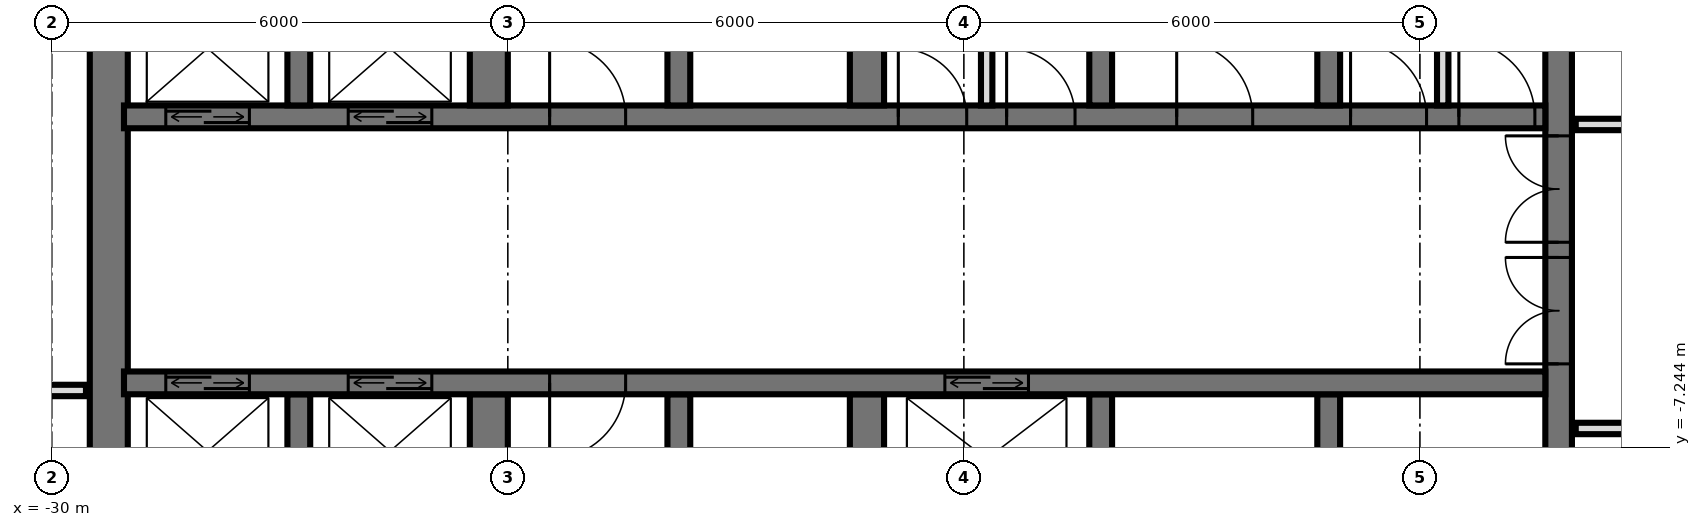
"""IFC4 building model, lengths in metres.
Left out: names, types, materials, properties, quantities, classifications, styles, units other than length and angle.
Written with IfcOpenShell. Run it as: python <this file> out.ifc"""

import sys

from ifc_helpers import new_model, si_unit, direction, frame, frame_2d, origin, place, context, subcontext, project, spatial, rectangle, extrude, element, fill, save


model = new_model("IFC4")
c1 = context("Model", 3, precision=1e-05, world=origin(), true_north=direction((0.0, 1.0)))
c2 = subcontext(c1, "Body", "Model", "MODEL_VIEW")
j1 = project(units=[si_unit("LENGTHUNIT", "METRE"), si_unit("PLANEANGLEUNIT", "RADIAN")], contexts=[c1])
p1 = place(None, origin())
s1 = spatial("IfcSite", under=j1, at=p1, CompositionType="ELEMENT")
p2 = place(p1, origin())
s2 = spatial("IfcBuilding", under=s1, at=p2, CompositionType="ELEMENT")
p3 = place(p2, frame((0.0, 0.0, 70.8)))
s3 = spatial("IfcBuildingStorey", under=s2, at=p3, CompositionType="ELEMENT", Elevation=70.8)
p4 = place(p3, frame((-10.175, -14.55, 0.0), z_axis=(0.0, 0.0, 1.0), x_axis=(0.0, 1.0, 0.0)))
e1 = element("IfcWall", 1, at=p4, inside=s3, PredefinedType="SHEAR", context=c2, shape_type="SweptSolid", body=[
    extrude(rectangle(XDim=14.1, YDim=0.35, at=frame_2d((7.05, 0.0))), origin(), (0.0, 0.0, 1.0), 3.6),
])
p5 = place(p4, frame((8.4, 0.0, 0.0)))
e2 = element("IfcOpeningElement", 2, at=p5, cuts=e1, PredefinedType="OPENING", context=c2, shape_type="SweptSolid", body=[
    extrude(rectangle(XDim=1.4, YDim=2.4, at=frame_2d((0.7, 1.2))), frame((0.0, 0.185, 0.0), z_axis=(0.0, -1.0, 0.0), x_axis=(1.0, 0.0, 0.0)), (0.0, 0.0, 1.0), 0.37),
])
p6 = place(p4, frame((10.0, 0.0, 0.0)))
e3 = element("IfcOpeningElement", 3, at=p6, cuts=e1, PredefinedType="OPENING", context=c2, shape_type="SweptSolid", body=[
    extrude(rectangle(XDim=1.4, YDim=2.4, at=frame_2d((0.7, 1.2))), frame((0.0, 0.185, 0.0), z_axis=(0.0, -1.0, 0.0), x_axis=(1.0, 0.0, 0.0)), (0.0, 0.0, 1.0), 0.37),
])
p7 = place(p4, frame((4.0, 0.0, 0.0)))
e4 = element("IfcOpeningElement", 4, at=p7, cuts=e1, PredefinedType="OPENING", context=c2, shape_type="SweptSolid", body=[
    extrude(rectangle(XDim=1.2, YDim=2.1, at=frame_2d((0.6, 1.05))), frame((0.0, 0.185, 0.0), z_axis=(0.0, -1.0, 0.0), x_axis=(1.0, 0.0, 0.0)), (0.0, 0.0, 1.0), 0.37),
])
p8 = place(p3, frame((-29.25, -14.55, 0.0), z_axis=(0.0, 0.0, 1.0), x_axis=(0.0, 1.0, 0.0)))
e5 = element("IfcWall", 5, at=p8, inside=s3, PredefinedType="SHEAR", context=c2, shape_type="SweptSolid", body=[
    extrude(rectangle(XDim=14.1, YDim=0.5, at=frame_2d((7.05, 0.0))), origin(), (0.0, 0.0, 1.0), 3.6),
])
p9 = place(p3, frame((-29.05, -2.9, 0.0), z_axis=(0.0, 0.0, 1.0), x_axis=(1.0, 0.0, 0.0)))
e6 = element("IfcWall", 6, at=p9, inside=s3, PredefinedType="SHEAR", context=c2, shape_type="SweptSolid", body=[
    extrude(rectangle(XDim=18.7, YDim=0.3, at=frame_2d((9.35, 0.0))), origin(), (0.0, 0.0, 1.0), 3.6),
])
p10 = place(p9, frame((2.95, 0.0, 0.0)))
e7 = element("IfcOpeningElement", 7, at=p10, cuts=e6, PredefinedType="OPENING", context=c2, shape_type="SweptSolid", body=[
    extrude(rectangle(XDim=1.1, YDim=2.1, at=frame_2d((0.55, 1.05))), frame((0.0, 0.16, 0.0), z_axis=(0.0, -1.0, 0.0), x_axis=(1.0, 0.0, 0.0)), (0.0, 0.0, 1.0), 0.32),
])
p11 = place(p9, frame((0.55, 0.0, 0.0)))
e8 = element("IfcOpeningElement", 8, at=p11, cuts=e6, PredefinedType="OPENING", context=c2, shape_type="SweptSolid", body=[
    extrude(rectangle(XDim=1.1, YDim=2.1, at=frame_2d((0.55, 1.05))), frame((0.0, 0.16, 0.0), z_axis=(0.0, -1.0, 0.0), x_axis=(1.0, 0.0, 0.0)), (0.0, 0.0, 1.0), 0.32),
])
p12 = place(p9, frame((11.613, 0.0, 0.0)))
e9 = element("IfcOpeningElement", 9, at=p12, cuts=e6, PredefinedType="OPENING", context=c2, shape_type="SweptSolid", body=[
    extrude(rectangle(XDim=0.9, YDim=2.1, at=frame_2d((0.45, 1.05))), frame((0.0, 0.16, 0.0), z_axis=(0.0, -1.0, 0.0), x_axis=(1.0, 0.0, 0.0)), (0.0, 0.0, 1.0), 0.32),
])
p13 = place(p9, frame((10.188, 0.0, 0.0)))
e10 = element("IfcOpeningElement", 10, at=p13, cuts=e6, PredefinedType="OPENING", context=c2, shape_type="SweptSolid", body=[
    extrude(rectangle(XDim=0.9, YDim=2.1, at=frame_2d((0.45, 1.05))), frame((0.0, 0.16, 0.0), z_axis=(0.0, -1.0, 0.0), x_axis=(1.0, 0.0, 0.0)), (0.0, 0.0, 1.0), 0.32),
])
p14 = place(p9, frame((17.562, 0.0, 0.0)))
e11 = element("IfcOpeningElement", 11, at=p14, cuts=e6, PredefinedType="OPENING", context=c2, shape_type="SweptSolid", body=[
    extrude(rectangle(XDim=1.0, YDim=2.1, at=frame_2d((0.5, 1.05))), frame((0.0, 0.16, 0.0), z_axis=(0.0, -1.0, 0.0), x_axis=(1.0, 0.0, 0.0)), (0.0, 0.0, 1.0), 0.32),
])
p15 = place(p9, frame((16.137, 0.0, 0.0)))
e12 = element("IfcOpeningElement", 12, at=p15, cuts=e6, PredefinedType="OPENING", context=c2, shape_type="SweptSolid", body=[
    extrude(rectangle(XDim=1.0, YDim=2.1, at=frame_2d((0.5, 1.05))), frame((0.0, 0.16, 0.0), z_axis=(0.0, -1.0, 0.0), x_axis=(1.0, 0.0, 0.0)), (0.0, 0.0, 1.0), 0.32),
])
p16 = place(p9, frame((13.85, 0.0, 0.0)))
e13 = element("IfcOpeningElement", 13, at=p16, cuts=e6, PredefinedType="OPENING", context=c2, shape_type="SweptSolid", body=[
    extrude(rectangle(XDim=1.0, YDim=2.1, at=frame_2d((0.5, 1.05))), frame((0.0, 0.16, 0.0), z_axis=(0.0, -1.0, 0.0), x_axis=(1.0, 0.0, 0.0)), (0.0, 0.0, 1.0), 0.32),
])
p17 = place(p9, frame((5.6, 0.0, 0.0)))
e14 = element("IfcOpeningElement", 14, at=p17, cuts=e6, PredefinedType="OPENING", context=c2, shape_type="SweptSolid", body=[
    extrude(rectangle(XDim=1.0, YDim=2.1, at=frame_2d((0.5, 1.05))), frame((0.0, 0.16, 0.0), z_axis=(0.0, -1.0, 0.0), x_axis=(1.0, 0.0, 0.0)), (0.0, 0.0, 1.0), 0.32),
])
p18 = place(p3, frame((-29.05, -6.4, 0.0), z_axis=(0.0, 0.0, 1.0), x_axis=(1.0, 0.0, 0.0)))
e15 = element("IfcWall", 15, at=p18, inside=s3, PredefinedType="SHEAR", context=c2, shape_type="SweptSolid", body=[
    extrude(rectangle(XDim=18.7, YDim=0.3, at=frame_2d((9.35, 0.0))), origin(), (0.0, 0.0, 1.0), 3.6),
])
p19 = place(p18, frame((2.95, 0.0, 0.0)))
e16 = element("IfcOpeningElement", 16, at=p19, cuts=e15, PredefinedType="OPENING", context=c2, shape_type="SweptSolid", body=[
    extrude(rectangle(XDim=1.1, YDim=2.1, at=frame_2d((0.55, 1.05))), frame((0.0, 0.16, 0.0), z_axis=(0.0, -1.0, 0.0), x_axis=(1.0, 0.0, 0.0)), (0.0, 0.0, 1.0), 0.32),
])
p20 = place(p18, frame((0.55, 0.0, 0.0)))
e17 = element("IfcOpeningElement", 17, at=p20, cuts=e15, PredefinedType="OPENING", context=c2, shape_type="SweptSolid", body=[
    extrude(rectangle(XDim=1.1, YDim=2.1, at=frame_2d((0.55, 1.05))), frame((0.0, 0.16, 0.0), z_axis=(0.0, -1.0, 0.0), x_axis=(1.0, 0.0, 0.0)), (0.0, 0.0, 1.0), 0.32),
])
p21 = place(p18, frame((10.8, 0.0, 0.0)))
e18 = element("IfcOpeningElement", 18, at=p21, cuts=e15, PredefinedType="OPENING", context=c2, shape_type="SweptSolid", body=[
    extrude(rectangle(XDim=1.1, YDim=2.1, at=frame_2d((0.55, 1.05))), frame((0.0, 0.16, 0.0), z_axis=(0.0, -1.0, 0.0), x_axis=(1.0, 0.0, 0.0)), (0.0, 0.0, 1.0), 0.32),
])
p22 = place(p18, frame((5.6, 0.0, 0.0)))
e19 = element("IfcOpeningElement", 19, at=p22, cuts=e15, PredefinedType="OPENING", context=c2, shape_type="SweptSolid", body=[
    extrude(rectangle(XDim=1.0, YDim=2.1, at=frame_2d((0.5, 1.05))), frame((0.0, 0.16, 0.0), z_axis=(0.0, -1.0, 0.0), x_axis=(1.0, 0.0, 0.0)), (0.0, 0.0, 1.0), 0.32),
])
for number, where, z_axis, x_axis in (
    (20, (-13.2, -2.75, 0.0), (0.0, 0.0, 1.0), (0.0, 1.0, 0.0)),
    (21, (-13.2, -8.85, 0.0), (0.0, 0.0, 1.0), (0.0, 1.0, 0.0)),
    (22, (-16.2, -2.75, 0.0), (0.0, 0.0, 1.0), (0.0, 1.0, 0.0)),
    (23, (-16.2, -8.85, 0.0), (0.0, 0.0, 1.0), (0.0, 1.0, 0.0)),
):
    element("IfcWall", number, at=place(p3, frame(where, z_axis=z_axis, x_axis=x_axis)), inside=s3, PredefinedType="SHEAR", context=c2, shape_type="SweptSolid", body=[
        extrude(rectangle(XDim=2.3, YDim=0.3, at=frame_2d((1.15, 0.0))), origin(), (0.0, 0.0, 1.0), 3.6),
    ])
for number, where, z_axis, x_axis in (
    (24, (-19.275, -2.75, 0.0), (0.0, 0.0, 1.0), (0.0, 1.0, 0.0)),
    (25, (-19.275, -8.85, 0.0), (0.0, 0.0, 1.0), (0.0, 1.0, 0.0)),
):
    element("IfcWall", number, at=place(p3, frame(where, z_axis=z_axis, x_axis=x_axis)), inside=s3, PredefinedType="SHEAR", context=c2, shape_type="SweptSolid", body=[
        extrude(rectangle(XDim=2.3, YDim=0.45, at=frame_2d((1.15, 0.0))), origin(), (0.0, 0.0, 1.0), 3.6),
    ])
for number, where, z_axis, x_axis in (
    (26, (-21.75, -2.75, 0.0), (0.0, 0.0, 1.0), (0.0, 1.0, 0.0)),
    (27, (-21.75, -8.85, 0.0), (0.0, 0.0, 1.0), (0.0, 1.0, 0.0)),
):
    element("IfcWall", number, at=place(p3, frame(where, z_axis=z_axis, x_axis=x_axis)), inside=s3, PredefinedType="SHEAR", context=c2, shape_type="SweptSolid", body=[
        extrude(rectangle(XDim=2.3, YDim=0.3, at=frame_2d((1.15, 0.0))), origin(), (0.0, 0.0, 1.0), 3.6),
    ])
for number, where, z_axis, x_axis in (
    (28, (-24.25, -2.75, 0.0), (0.0, 0.0, 1.0), (0.0, 1.0, 0.0)),
    (29, (-24.25, -8.85, 0.0), (0.0, 0.0, 1.0), (0.0, 1.0, 0.0)),
):
    element("IfcWall", number, at=place(p3, frame(where, z_axis=z_axis, x_axis=x_axis)), inside=s3, PredefinedType="SHEAR", context=c2, shape_type="SweptSolid", body=[
        extrude(rectangle(XDim=2.3, YDim=0.5, at=frame_2d((1.15, 0.0))), origin(), (0.0, 0.0, 1.0), 3.6),
    ])
for number, where, z_axis, x_axis in (
    (30, (-26.75, -2.75, 0.0), (0.0, 0.0, 1.0), (0.0, 1.0, 0.0)),
    (31, (-26.75, -8.85, 0.0), (0.0, 0.0, 1.0), (0.0, 1.0, 0.0)),
):
    element("IfcWall", number, at=place(p3, frame(where, z_axis=z_axis, x_axis=x_axis)), inside=s3, PredefinedType="SHEAR", context=c2, shape_type="SweptSolid", body=[
        extrude(rectangle(XDim=2.3, YDim=0.3, at=frame_2d((1.15, 0.0))), origin(), (0.0, 0.0, 1.0), 3.6),
    ])
for number, where, z_axis, x_axis in (
    (32, (-17.7, -2.75, 0.0), (0.0, 0.0, 1.0), (0.0, 1.0, 0.0)),
    (33, (-11.7, -2.75, 0.0), (0.0, 0.0, 1.0), (0.0, 1.0, 0.0)),
):
    element("IfcWall", number, at=place(p3, frame(where, z_axis=z_axis, x_axis=x_axis)), inside=s3, PredefinedType="PARTITIONING", context=c2, shape_type="SweptSolid", body=[
        extrude(rectangle(XDim=2.3, YDim=0.15, at=frame_2d((1.15, 0.0))), origin(), (0.0, 0.0, 1.0), 3.3),
    ])
p23 = place(p3, frame((-9.95, -7.0, 0.0), z_axis=(0.0, 0.0, 1.0), x_axis=(1.0, 0.0, 0.0)))
e34 = element("IfcWall", 34, at=p23, inside=s3, PredefinedType="PARTITIONING", context=c2, shape_type="SweptSolid", body=[
    extrude(rectangle(XDim=19.9, YDim=0.15, at=frame_2d((9.95, 0.0))), origin(), (0.0, 0.0, 1.0), 3.32),
])
p24 = place(p23, frame((9.45, 0.0, 0.0)))
e35 = element("IfcOpeningElement", 35, at=p24, cuts=e34, PredefinedType="OPENING", context=c2, shape_type="SweptSolid", body=[
    extrude(rectangle(XDim=1.0, YDim=2.1, at=frame_2d((0.5, 1.05))), frame((0.0, 0.085, 0.0), z_axis=(0.0, -1.0, 0.0), x_axis=(1.0, 0.0, 0.0)), (0.0, 0.0, 1.0), 0.17),
])
p25 = place(p23, frame((3.45, 0.0, 0.0)))
e36 = element("IfcOpeningElement", 36, at=p25, cuts=e34, PredefinedType="OPENING", context=c2, shape_type="SweptSolid", body=[
    extrude(rectangle(XDim=1.0, YDim=2.1, at=frame_2d((0.5, 1.05))), frame((0.0, 0.085, 0.0), z_axis=(0.0, -1.0, 0.0), x_axis=(1.0, 0.0, 0.0)), (0.0, 0.0, 1.0), 0.17),
])
p26 = place(p3, frame((-33.12, -6.5, 0.0), z_axis=(0.0, 0.0, 1.0), x_axis=(1.0, 0.0, 0.0)))
e37 = element("IfcWall", 37, at=p26, inside=s3, PredefinedType="PARTITIONING", context=c2, shape_type="SweptSolid", body=[
    extrude(rectangle(XDim=3.57, YDim=0.15, at=frame_2d((1.785, 0.0))), origin(), (0.0, 0.0, 1.0), 3.32),
])
p27 = place(p26, frame((1.27, 0.0, 0.0)))
e38 = element("IfcOpeningElement", 38, at=p27, cuts=e37, PredefinedType="OPENING", context=c2, shape_type="SweptSolid", body=[
    extrude(rectangle(XDim=0.9, YDim=2.1, at=frame_2d((0.45, 1.05))), frame((0.0, 0.085, 0.0), z_axis=(0.0, -1.0, 0.0), x_axis=(1.0, 0.0, 0.0)), (0.0, 0.0, 1.0), 0.17),
])
p28 = place(p3, frame((-9.95, -3.0, 0.0), z_axis=(0.0, 0.0, 1.0), x_axis=(1.0, 0.0, 0.0)))
e39 = element("IfcWall", 39, at=p28, inside=s3, PredefinedType="PARTITIONING", context=c2, shape_type="SweptSolid", body=[
    extrude(rectangle(XDim=19.9, YDim=0.15, at=frame_2d((9.95, 0.0))), origin(), (0.0, 0.0, 1.0), 3.32),
])
p29 = place(p28, frame((1.45, 0.0, 0.0)))
e40 = element("IfcOpeningElement", 40, at=p29, cuts=e39, PredefinedType="OPENING", context=c2, shape_type="SweptSolid", body=[
    extrude(rectangle(XDim=1.0, YDim=2.1, at=frame_2d((0.5, 1.05))), frame((0.0, 0.085, 0.0), z_axis=(0.0, -1.0, 0.0), x_axis=(1.0, 0.0, 0.0)), (0.0, 0.0, 1.0), 0.17),
])
p30 = place(p28, frame((4.95, 0.0, 0.0)))
e41 = element("IfcOpeningElement", 41, at=p30, cuts=e39, PredefinedType="OPENING", context=c2, shape_type="SweptSolid", body=[
    extrude(rectangle(XDim=1.0, YDim=2.1, at=frame_2d((0.5, 1.05))), frame((0.0, 0.085, 0.0), z_axis=(0.0, -1.0, 0.0), x_axis=(1.0, 0.0, 0.0)), (0.0, 0.0, 1.0), 0.17),
])
p31 = place(p28, frame((7.7, 0.0, 0.0)))
e42 = element("IfcOpeningElement", 42, at=p31, cuts=e39, PredefinedType="OPENING", context=c2, shape_type="SweptSolid", body=[
    extrude(rectangle(XDim=1.0, YDim=2.1, at=frame_2d((0.5, 1.05))), frame((0.0, 0.085, 0.0), z_axis=(0.0, -1.0, 0.0), x_axis=(1.0, 0.0, 0.0)), (0.0, 0.0, 1.0), 0.17),
])
p32 = place(p28, frame((14.2, 0.0, 0.0)))
e43 = element("IfcOpeningElement", 43, at=p32, cuts=e39, PredefinedType="OPENING", context=c2, shape_type="SweptSolid", body=[
    extrude(rectangle(XDim=1.0, YDim=2.1, at=frame_2d((0.5, 1.05))), frame((0.0, 0.085, 0.0), z_axis=(0.0, -1.0, 0.0), x_axis=(1.0, 0.0, 0.0)), (0.0, 0.0, 1.0), 0.17),
])
p33 = place(p10, origin())
e44 = element("IfcDoor", 44, at=p33, inside=s3, OperationType="DOUBLE_DOOR_SLIDING", PredefinedType="USERDEFINED", context=c2, shape_type="SweptSolid", body=[
    extrude(rectangle(XDim=1.1, YDim=2.1, at=frame_2d((0.55, 1.05))), frame((0.0, 0.025, 0.0), z_axis=(0.0, -1.0, 0.0), x_axis=(1.0, 0.0, 0.0)), (0.0, 0.0, 1.0), 0.05),
])
fill(e7, e44)
p34 = place(p11, origin())
e45 = element("IfcDoor", 45, at=p34, inside=s3, OperationType="DOUBLE_DOOR_SLIDING", PredefinedType="USERDEFINED", context=c2, shape_type="SweptSolid", body=[
    extrude(rectangle(XDim=1.1, YDim=2.1, at=frame_2d((0.55, 1.05))), frame((0.0, 0.025, 0.0), z_axis=(0.0, -1.0, 0.0), x_axis=(1.0, 0.0, 0.0)), (0.0, 0.0, 1.0), 0.05),
])
fill(e8, e45)
p35 = place(p19, origin())
e46 = element("IfcDoor", 46, at=p35, inside=s3, OperationType="DOUBLE_DOOR_SLIDING", PredefinedType="USERDEFINED", context=c2, shape_type="SweptSolid", body=[
    extrude(rectangle(XDim=1.1, YDim=2.1, at=frame_2d((0.55, 1.05))), frame((0.0, 0.025, 0.0), z_axis=(0.0, -1.0, 0.0), x_axis=(1.0, 0.0, 0.0)), (0.0, 0.0, 1.0), 0.05),
])
fill(e16, e46)
p36 = place(p20, origin())
e47 = element("IfcDoor", 47, at=p36, inside=s3, OperationType="DOUBLE_DOOR_SLIDING", PredefinedType="USERDEFINED", context=c2, shape_type="SweptSolid", body=[
    extrude(rectangle(XDim=1.1, YDim=2.1, at=frame_2d((0.55, 1.05))), frame((0.0, 0.025, 0.0), z_axis=(0.0, -1.0, 0.0), x_axis=(1.0, 0.0, 0.0)), (0.0, 0.0, 1.0), 0.05),
])
fill(e17, e47)
p37 = place(p21, origin())
e48 = element("IfcDoor", 48, at=p37, inside=s3, OperationType="DOUBLE_DOOR_SLIDING", PredefinedType="USERDEFINED", context=c2, shape_type="SweptSolid", body=[
    extrude(rectangle(XDim=1.1, YDim=2.1, at=frame_2d((0.55, 1.05))), frame((0.0, 0.025, 0.0), z_axis=(0.0, -1.0, 0.0), x_axis=(1.0, 0.0, 0.0)), (0.0, 0.0, 1.0), 0.05),
])
fill(e18, e48)
p38 = place(p5, origin())
e49 = element("IfcDoor", 49, at=p38, inside=s3, OperationType="DOUBLE_DOOR_SINGLE_SWING", PredefinedType="DOOR", context=c2, shape_type="SweptSolid", body=[
    extrude(rectangle(XDim=1.4, YDim=2.4, at=frame_2d((0.7, 1.2))), frame((0.0, 0.025, 0.0), z_axis=(0.0, -1.0, 0.0), x_axis=(1.0, 0.0, 0.0)), (0.0, 0.0, 1.0), 0.05),
])
fill(e2, e49)
p39 = place(p6, origin())
e50 = element("IfcDoor", 50, at=p39, inside=s3, OperationType="DOUBLE_DOOR_SINGLE_SWING", PredefinedType="DOOR", context=c2, shape_type="SweptSolid", body=[
    extrude(rectangle(XDim=1.4, YDim=2.4, at=frame_2d((0.7, 1.2))), frame((0.0, 0.025, 0.0), z_axis=(0.0, -1.0, 0.0), x_axis=(1.0, 0.0, 0.0)), (0.0, 0.0, 1.0), 0.05),
])
fill(e3, e50)
p40 = place(p12, origin())
e51 = element("IfcDoor", 51, at=p40, inside=s3, OperationType="SINGLE_SWING_RIGHT", PredefinedType="DOOR", context=c2, shape_type="SweptSolid", body=[
    extrude(rectangle(XDim=0.9, YDim=2.1, at=frame_2d((0.45, 1.05))), frame((0.0, 0.025, 0.0), z_axis=(0.0, -1.0, 0.0), x_axis=(1.0, 0.0, 0.0)), (0.0, 0.0, 1.0), 0.05),
])
fill(e9, e51)
p41 = place(p13, origin())
e52 = element("IfcDoor", 52, at=p41, inside=s3, OperationType="SINGLE_SWING_RIGHT", PredefinedType="DOOR", context=c2, shape_type="SweptSolid", body=[
    extrude(rectangle(XDim=0.9, YDim=2.1, at=frame_2d((0.45, 1.05))), frame((0.0, 0.025, 0.0), z_axis=(0.0, -1.0, 0.0), x_axis=(1.0, 0.0, 0.0)), (0.0, 0.0, 1.0), 0.05),
])
fill(e10, e52)
p42 = place(p14, origin())
e53 = element("IfcDoor", 53, at=p42, inside=s3, OperationType="SINGLE_SWING_RIGHT", PredefinedType="DOOR", context=c2, shape_type="SweptSolid", body=[
    extrude(rectangle(XDim=1.0, YDim=2.1, at=frame_2d((0.5, 1.05))), frame((0.0, 0.025, 0.0), z_axis=(0.0, -1.0, 0.0), x_axis=(1.0, 0.0, 0.0)), (0.0, 0.0, 1.0), 0.05),
])
fill(e11, e53)
p43 = place(p15, origin())
e54 = element("IfcDoor", 54, at=p43, inside=s3, OperationType="SINGLE_SWING_RIGHT", PredefinedType="DOOR", context=c2, shape_type="SweptSolid", body=[
    extrude(rectangle(XDim=1.0, YDim=2.1, at=frame_2d((0.5, 1.05))), frame((0.0, 0.025, 0.0), z_axis=(0.0, -1.0, 0.0), x_axis=(1.0, 0.0, 0.0)), (0.0, 0.0, 1.0), 0.05),
])
fill(e12, e54)
p44 = place(p16, origin())
e55 = element("IfcDoor", 55, at=p44, inside=s3, OperationType="SINGLE_SWING_RIGHT", PredefinedType="DOOR", context=c2, shape_type="SweptSolid", body=[
    extrude(rectangle(XDim=1.0, YDim=2.1, at=frame_2d((0.5, 1.05))), frame((0.0, 0.025, 0.0), z_axis=(0.0, -1.0, 0.0), x_axis=(1.0, 0.0, 0.0)), (0.0, 0.0, 1.0), 0.05),
])
fill(e13, e55)
p45 = place(p17, origin())
e56 = element("IfcDoor", 56, at=p45, inside=s3, OperationType="SINGLE_SWING_RIGHT", PredefinedType="DOOR", context=c2, shape_type="SweptSolid", body=[
    extrude(rectangle(XDim=1.0, YDim=2.1, at=frame_2d((0.5, 1.05))), frame((0.0, 0.025, 0.0), z_axis=(0.0, -1.0, 0.0), x_axis=(1.0, 0.0, 0.0)), (0.0, 0.0, 1.0), 0.05),
])
fill(e14, e56)
p46 = place(p22, frame((0.5, 0.0, 0.0), z_axis=(0.0, 0.0, 1.0), x_axis=(-1.0, 0.0, 0.0)))
e57 = element("IfcDoor", 57, at=p46, inside=s3, OperationType="SINGLE_SWING_LEFT", PredefinedType="DOOR", context=c2, shape_type="SweptSolid", body=[
    extrude(rectangle(XDim=1.0, YDim=2.1, at=frame_2d((0.0, 1.05))), frame((0.0, -0.025, 0.0), z_axis=(0.0, 1.0, 0.0), x_axis=(-1.0, 0.0, 0.0)), (0.0, 0.0, 1.0), 0.05),
])
fill(e19, e57)
save(model, sys.argv[1])
